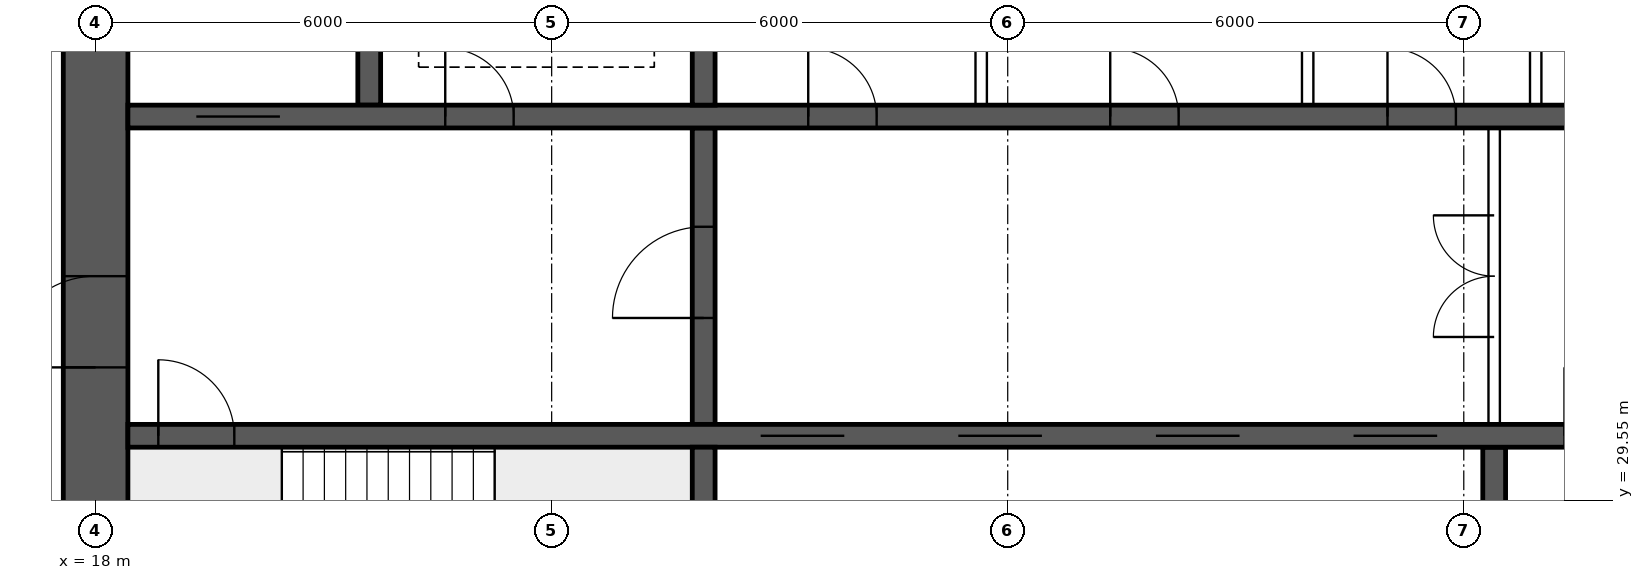
"""IFC4 building model, lengths in metres.
Left out: names, types, materials, properties, quantities, classifications, styles, units other than length and angle.
Written with IfcOpenShell. Run it as: python <this file> out.ifc"""

import sys

from ifc_helpers import new_model, si_unit, direction, frame, frame_2d, origin, place, context, subcontext, project, spatial, rectangle, extrude, element, fill, save


model = new_model("IFC4")
c1 = context("Model", 3, precision=1e-05, world=origin(), true_north=direction((0.0, 1.0)))
c2 = subcontext(c1, "Body", "Model", "MODEL_VIEW")
j1 = project(units=[si_unit("LENGTHUNIT", "METRE"), si_unit("PLANEANGLEUNIT", "RADIAN")], contexts=[c1])
p1 = place(None, origin())
s1 = spatial("IfcSite", under=j1, at=p1, CompositionType="ELEMENT")
p2 = place(p1, origin())
s2 = spatial("IfcBuilding", under=s1, at=p2, CompositionType="ELEMENT")
p3 = place(p2, frame((0.0, 0.0, 167.35)))
s3 = spatial("IfcBuildingStorey", under=s2, at=p3, CompositionType="ELEMENT", Elevation=167.35)
p4 = place(p3, frame((18.0, 26.225, 0.0), z_axis=(0.0, 0.0, 1.0), x_axis=(0.0, 1.0, 0.0)))
e1 = element("IfcWall", 1, at=p4, inside=s3, PredefinedType="SHEAR", context=c2, shape_type="SweptSolid", body=[
    extrude(rectangle(XDim=11.55, YDim=0.85, at=frame_2d((5.775, 0.0))), origin(), (0.0, 0.0, 1.0), 3.75),
])
p5 = place(p4, frame((5.075, 0.0, 0.0)))
e2 = element("IfcOpeningElement", 2, at=p5, cuts=e1, PredefinedType="OPENING", context=c2, shape_type="SweptSolid", body=[
    extrude(rectangle(XDim=1.2, YDim=2.1, at=frame_2d((0.6, 1.05))), frame((0.0, 0.435, 0.0), z_axis=(0.0, -1.0, 0.0), x_axis=(1.0, 0.0, 0.0)), (0.0, 0.0, 1.0), 0.87),
])
p6 = place(p3, frame((18.425, 30.4, 0.0), z_axis=(0.0, 0.0, 1.0), x_axis=(1.0, 0.0, 0.0)))
e3 = element("IfcWall", 3, at=p6, inside=s3, PredefinedType="SHEAR", context=c2, shape_type="SweptSolid", body=[
    extrude(rectangle(XDim=47.15, YDim=0.3, at=frame_2d((23.575, 0.0))), origin(), (0.0, 0.0, 1.0), 3.75),
])
p7 = place(p6, frame((0.4, 0.0, 0.0)))
e4 = element("IfcOpeningElement", 4, at=p7, cuts=e3, PredefinedType="OPENING", context=c2, shape_type="SweptSolid", body=[
    extrude(rectangle(XDim=1.0, YDim=2.1, at=frame_2d((0.5, 1.05))), frame((0.0, 0.16, 0.0), z_axis=(0.0, -1.0, 0.0), x_axis=(1.0, 0.0, 0.0)), (0.0, 0.0, 1.0), 0.32),
])
p8 = place(p6, frame((45.75, 0.0, 0.0)))
e5 = element("IfcOpeningElement", 5, at=p8, cuts=e3, PredefinedType="OPENING", context=c2, shape_type="SweptSolid", body=[
    extrude(rectangle(XDim=1.0, YDim=2.1, at=frame_2d((0.5, 1.05))), frame((0.0, 0.16, 0.0), z_axis=(0.0, -1.0, 0.0), x_axis=(1.0, 0.0, 0.0)), (0.0, 0.0, 1.0), 0.32),
])
p9 = place(p6, frame((8.325, 0.0, 0.0)))
e6 = element("IfcOpeningElement", 6, at=p9, cuts=e3, PredefinedType="OPENING", context=c2, shape_type="SweptSolid", body=[
    extrude(rectangle(XDim=1.1, YDim=2.1, at=frame_2d((0.55, 1.05))), frame((0.0, 0.16, 0.0), z_axis=(0.0, -1.0, 0.0), x_axis=(1.0, 0.0, 0.0)), (0.0, 0.0, 1.0), 0.32),
])
p10 = place(p6, frame((10.925, 0.0, 0.0)))
e7 = element("IfcOpeningElement", 7, at=p10, cuts=e3, PredefinedType="OPENING", context=c2, shape_type="SweptSolid", body=[
    extrude(rectangle(XDim=1.1, YDim=2.1, at=frame_2d((0.55, 1.05))), frame((0.0, 0.16, 0.0), z_axis=(0.0, -1.0, 0.0), x_axis=(1.0, 0.0, 0.0)), (0.0, 0.0, 1.0), 0.32),
])
p11 = place(p6, frame((13.525, 0.0, 0.0)))
e8 = element("IfcOpeningElement", 8, at=p11, cuts=e3, PredefinedType="OPENING", context=c2, shape_type="SweptSolid", body=[
    extrude(rectangle(XDim=1.1, YDim=2.1, at=frame_2d((0.55, 1.05))), frame((0.0, 0.16, 0.0), z_axis=(0.0, -1.0, 0.0), x_axis=(1.0, 0.0, 0.0)), (0.0, 0.0, 1.0), 0.32),
])
p12 = place(p6, frame((16.125, 0.0, 0.0)))
e9 = element("IfcOpeningElement", 9, at=p12, cuts=e3, PredefinedType="OPENING", context=c2, shape_type="SweptSolid", body=[
    extrude(rectangle(XDim=1.1, YDim=2.1, at=frame_2d((0.55, 1.05))), frame((0.0, 0.16, 0.0), z_axis=(0.0, -1.0, 0.0), x_axis=(1.0, 0.0, 0.0)), (0.0, 0.0, 1.0), 0.32),
])
p13 = place(p6, frame((18.9, 0.0, 0.0)))
e10 = element("IfcOpeningElement", 10, at=p13, cuts=e3, PredefinedType="OPENING", context=c2, shape_type="SweptSolid", body=[
    extrude(rectangle(XDim=0.9, YDim=2.1, at=frame_2d((0.45, 1.05))), frame((0.0, 0.16, 0.0), z_axis=(0.0, -1.0, 0.0), x_axis=(1.0, 0.0, 0.0)), (0.0, 0.0, 1.0), 0.32),
])
p14 = place(p6, frame((30.192, 0.0, 0.0)))
e11 = element("IfcOpeningElement", 11, at=p14, cuts=e3, PredefinedType="OPENING", context=c2, shape_type="SweptSolid", body=[
    extrude(rectangle(XDim=1.1, YDim=2.1, at=frame_2d((0.55, 1.05))), frame((0.0, 0.16, 0.0), z_axis=(0.0, -1.0, 0.0), x_axis=(1.0, 0.0, 0.0)), (0.0, 0.0, 1.0), 0.32),
])
p15 = place(p6, frame((33.725, 0.0, 0.0)))
e12 = element("IfcOpeningElement", 12, at=p15, cuts=e3, PredefinedType="OPENING", context=c2, shape_type="SweptSolid", body=[
    extrude(rectangle(XDim=1.1, YDim=2.1, at=frame_2d((0.55, 1.05))), frame((0.0, 0.16, 0.0), z_axis=(0.0, -1.0, 0.0), x_axis=(1.0, 0.0, 0.0)), (0.0, 0.0, 1.0), 0.32),
])
p16 = place(p6, frame((37.258, 0.0, 0.0)))
e13 = element("IfcOpeningElement", 13, at=p16, cuts=e3, PredefinedType="OPENING", context=c2, shape_type="SweptSolid", body=[
    extrude(rectangle(XDim=1.1, YDim=2.1, at=frame_2d((0.55, 1.05))), frame((0.0, 0.16, 0.0), z_axis=(0.0, -1.0, 0.0), x_axis=(1.0, 0.0, 0.0)), (0.0, 0.0, 1.0), 0.32),
])
p17 = place(p3, frame((18.425, 34.6, 0.0), z_axis=(0.0, 0.0, 1.0), x_axis=(1.0, 0.0, 0.0)))
e14 = element("IfcWall", 14, at=p17, inside=s3, PredefinedType="SHEAR", context=c2, shape_type="SweptSolid", body=[
    extrude(rectangle(XDim=47.15, YDim=0.3, at=frame_2d((23.575, 0.0))), origin(), (0.0, 0.0, 1.0), 3.75),
])
p18 = place(p17, frame((0.9, 0.0, 0.0)))
e15 = element("IfcOpeningElement", 15, at=p18, cuts=e14, PredefinedType="OPENING", context=c2, shape_type="SweptSolid", body=[
    extrude(rectangle(XDim=1.1, YDim=2.1, at=frame_2d((0.55, 1.05))), frame((0.0, 0.16, 0.0), z_axis=(0.0, -1.0, 0.0), x_axis=(1.0, 0.0, 0.0)), (0.0, 0.0, 1.0), 0.32),
])
p19 = place(p17, frame((45.15, 0.0, 0.0)))
e16 = element("IfcOpeningElement", 16, at=p19, cuts=e14, PredefinedType="OPENING", context=c2, shape_type="SweptSolid", body=[
    extrude(rectangle(XDim=1.1, YDim=2.1, at=frame_2d((0.55, 1.05))), frame((0.0, 0.16, 0.0), z_axis=(0.0, -1.0, 0.0), x_axis=(1.0, 0.0, 0.0)), (0.0, 0.0, 1.0), 0.32),
])
p20 = place(p17, frame((4.175, 0.0, 0.0)))
e17 = element("IfcOpeningElement", 17, at=p20, cuts=e14, PredefinedType="OPENING", context=c2, shape_type="SweptSolid", body=[
    extrude(rectangle(XDim=0.9, YDim=2.1, at=frame_2d((0.45, 1.05))), frame((0.0, 0.16, 0.0), z_axis=(0.0, -1.0, 0.0), x_axis=(1.0, 0.0, 0.0)), (0.0, 0.0, 1.0), 0.32),
])
p21 = place(p17, frame((42.075, 0.0, 0.0)))
e18 = element("IfcOpeningElement", 18, at=p21, cuts=e14, PredefinedType="OPENING", context=c2, shape_type="SweptSolid", body=[
    extrude(rectangle(XDim=0.9, YDim=2.1, at=frame_2d((0.45, 1.05))), frame((0.0, 0.16, 0.0), z_axis=(0.0, -1.0, 0.0), x_axis=(1.0, 0.0, 0.0)), (0.0, 0.0, 1.0), 0.32),
])
p22 = place(p17, frame((8.95, 0.0, 0.0)))
e19 = element("IfcOpeningElement", 19, at=p22, cuts=e14, PredefinedType="OPENING", context=c2, shape_type="SweptSolid", body=[
    extrude(rectangle(XDim=0.9, YDim=2.1, at=frame_2d((0.45, 1.05))), frame((0.0, 0.16, 0.0), z_axis=(0.0, -1.0, 0.0), x_axis=(1.0, 0.0, 0.0)), (0.0, 0.0, 1.0), 0.32),
])
p23 = place(p17, frame((12.924, 0.0, 0.0)))
e20 = element("IfcOpeningElement", 20, at=p23, cuts=e14, PredefinedType="OPENING", context=c2, shape_type="SweptSolid", body=[
    extrude(rectangle(XDim=0.9, YDim=2.1, at=frame_2d((0.45, 1.05))), frame((0.0, 0.16, 0.0), z_axis=(0.0, -1.0, 0.0), x_axis=(1.0, 0.0, 0.0)), (0.0, 0.0, 1.0), 0.32),
])
p24 = place(p17, frame((16.571, 0.0, 0.0)))
e21 = element("IfcOpeningElement", 21, at=p24, cuts=e14, PredefinedType="OPENING", context=c2, shape_type="SweptSolid", body=[
    extrude(rectangle(XDim=0.9, YDim=2.1, at=frame_2d((0.45, 1.05))), frame((0.0, 0.16, 0.0), z_axis=(0.0, -1.0, 0.0), x_axis=(1.0, 0.0, 0.0)), (0.0, 0.0, 1.0), 0.32),
])
p25 = place(p17, frame((20.33, 0.0, 0.0)))
e22 = element("IfcOpeningElement", 22, at=p25, cuts=e14, PredefinedType="OPENING", context=c2, shape_type="SweptSolid", body=[
    extrude(rectangle(XDim=0.9, YDim=2.1, at=frame_2d((0.45, 1.05))), frame((0.0, 0.16, 0.0), z_axis=(0.0, -1.0, 0.0), x_axis=(1.0, 0.0, 0.0)), (0.0, 0.0, 1.0), 0.32),
])
p26 = place(p17, frame((24.736, 0.0, 0.0)))
e23 = element("IfcOpeningElement", 23, at=p26, cuts=e14, PredefinedType="OPENING", context=c2, shape_type="SweptSolid", body=[
    extrude(rectangle(XDim=0.9, YDim=2.1, at=frame_2d((0.45, 1.05))), frame((0.0, 0.16, 0.0), z_axis=(0.0, -1.0, 0.0), x_axis=(1.0, 0.0, 0.0)), (0.0, 0.0, 1.0), 0.32),
])
p27 = place(p17, frame((27.533, 0.0, 0.0)))
e24 = element("IfcOpeningElement", 24, at=p27, cuts=e14, PredefinedType="OPENING", context=c2, shape_type="SweptSolid", body=[
    extrude(rectangle(XDim=0.9, YDim=2.1, at=frame_2d((0.45, 1.05))), frame((0.0, 0.16, 0.0), z_axis=(0.0, -1.0, 0.0), x_axis=(1.0, 0.0, 0.0)), (0.0, 0.0, 1.0), 0.32),
])
p28 = place(p17, frame((29.906, 0.0, 0.0)))
e25 = element("IfcOpeningElement", 25, at=p28, cuts=e14, PredefinedType="OPENING", context=c2, shape_type="SweptSolid", body=[
    extrude(rectangle(XDim=0.9, YDim=2.1, at=frame_2d((0.45, 1.05))), frame((0.0, 0.16, 0.0), z_axis=(0.0, -1.0, 0.0), x_axis=(1.0, 0.0, 0.0)), (0.0, 0.0, 1.0), 0.32),
])
p29 = place(p17, frame((33.756, 0.0, 0.0)))
e26 = element("IfcOpeningElement", 26, at=p29, cuts=e14, PredefinedType="OPENING", context=c2, shape_type="SweptSolid", body=[
    extrude(rectangle(XDim=0.9, YDim=2.1, at=frame_2d((0.45, 1.05))), frame((0.0, 0.16, 0.0), z_axis=(0.0, -1.0, 0.0), x_axis=(1.0, 0.0, 0.0)), (0.0, 0.0, 1.0), 0.32),
])
p30 = place(p17, frame((37.504, 0.0, 0.0)))
e27 = element("IfcOpeningElement", 27, at=p30, cuts=e14, PredefinedType="OPENING", context=c2, shape_type="SweptSolid", body=[
    extrude(rectangle(XDim=0.9, YDim=2.1, at=frame_2d((0.45, 1.05))), frame((0.0, 0.16, 0.0), z_axis=(0.0, -1.0, 0.0), x_axis=(1.0, 0.0, 0.0)), (0.0, 0.0, 1.0), 0.32),
])
p31 = place(p3, frame((26.0, 26.225, 0.0), z_axis=(0.0, 0.0, 1.0), x_axis=(0.0, 1.0, 0.0)))
e28 = element("IfcWall", 28, at=p31, inside=s3, PredefinedType="SHEAR", context=c2, shape_type="SweptSolid", body=[
    extrude(rectangle(XDim=4.025, YDim=0.3, at=frame_2d((2.012, 0.0))), origin(), (0.0, 0.0, 1.0), 3.75),
])
p32 = place(p3, frame((26.0, 30.55, 0.0), z_axis=(0.0, 0.0, 1.0), x_axis=(0.0, 1.0, 0.0)))
e29 = element("IfcWall", 29, at=p32, inside=s3, PredefinedType="SHEAR", context=c2, shape_type="SweptSolid", body=[
    extrude(rectangle(XDim=3.9, YDim=0.3, at=frame_2d((1.95, 0.0))), origin(), (0.0, 0.0, 1.0), 3.75),
])
p33 = place(p32, frame((1.4, 0.0, 0.0)))
e30 = element("IfcOpeningElement", 30, at=p33, cuts=e29, PredefinedType="OPENING", context=c2, shape_type="SweptSolid", body=[
    extrude(rectangle(XDim=1.2, YDim=2.1, at=frame_2d((0.6, 1.05))), frame((0.0, 0.16, 0.0), z_axis=(0.0, -1.0, 0.0), x_axis=(1.0, 0.0, 0.0)), (0.0, 0.0, 1.0), 0.32),
])
for number, where, z_axis, x_axis in (
    (31, (21.6, 34.75, 0.0), (0.0, 0.0, 1.0), (0.0, 1.0, 0.0)),
    (32, (26.0, 34.75, 0.0), (0.0, 0.0, 1.0), (0.0, 1.0, 0.0)),
):
    element("IfcWall", number, at=place(p3, frame(where, z_axis=z_axis, x_axis=x_axis)), inside=s3, PredefinedType="SHEAR", context=c2, shape_type="SweptSolid", body=[
        extrude(rectangle(XDim=3.025, YDim=0.3, at=frame_2d((1.512, 0.0))), origin(), (0.0, 0.0, 1.0), 3.75),
    ])
p34 = place(p3, frame((36.4, 26.225, 0.0), z_axis=(0.0, 0.0, 1.0), x_axis=(0.0, 1.0, 0.0)))
e33 = element("IfcWall", 33, at=p34, inside=s3, PredefinedType="SHEAR", context=c2, shape_type="SweptSolid", body=[
    extrude(rectangle(XDim=4.025, YDim=0.3, at=frame_2d((2.012, 0.0))), origin(), (0.0, 0.0, 1.0), 3.75),
])
p35 = place(p3, frame((36.4, 30.55, 0.0), z_axis=(0.0, 0.0, 1.0), x_axis=(0.0, 1.0, 0.0)))
e34 = element("IfcWall", 34, at=p35, inside=s3, PredefinedType="SOLIDWALL", context=c2, shape_type="SweptSolid", body=[
    extrude(rectangle(XDim=3.9, YDim=0.15, at=frame_2d((1.95, 0.0))), origin(), (0.0, 0.0, 1.0), 3.5),
])
p36 = place(p35, frame((1.15, 0.0, 0.0)))
e35 = element("IfcOpeningElement", 35, at=p36, cuts=e34, PredefinedType="OPENING", context=c2, shape_type="SweptSolid", body=[
    extrude(rectangle(XDim=1.6, YDim=2.1, at=frame_2d((0.8, 1.05))), frame((0.0, 0.085, 0.0), z_axis=(0.0, -1.0, 0.0), x_axis=(1.0, 0.0, 0.0)), (0.0, 0.0, 1.0), 0.17),
])
for number, where, z_axis, x_axis in (
    (36, (29.651, 34.75, 0.0), (0.0, 0.0, 1.0), (0.0, 1.0, 0.0)),
    (37, (33.946, 34.75, 0.0), (0.0, 0.0, 1.0), (0.0, 1.0, 0.0)),
    (38, (36.946, 34.75, 0.0), (0.0, 0.0, 1.0), (0.0, 1.0, 0.0)),
):
    element("IfcWall", number, at=place(p3, frame(where, z_axis=z_axis, x_axis=x_axis)), inside=s3, PredefinedType="SOLIDWALL", context=c2, shape_type="SweptSolid", body=[
        extrude(rectangle(XDim=3.025, YDim=0.15, at=frame_2d((1.512, 0.0))), origin(), (0.0, 0.0, 1.0), 3.5),
    ])
p37 = place(p36, origin())
e39 = element("IfcDoor", 39, at=p37, inside=s3, OperationType="DOUBLE_DOOR_SINGLE_SWING", PredefinedType="DOOR", context=c2, shape_type="SweptSolid", body=[
    extrude(rectangle(XDim=1.6, YDim=2.1, at=frame_2d((0.8, 1.05))), frame((0.0, 0.025, 0.0), z_axis=(0.0, -1.0, 0.0), x_axis=(1.0, 0.0, 0.0)), (0.0, 0.0, 1.0), 0.05),
])
fill(e35, e39)
p38 = place(p5, origin())
e40 = element("IfcDoor", 40, at=p38, inside=s3, OperationType="SINGLE_SWING_LEFT", PredefinedType="DOOR", context=c2, shape_type="SweptSolid", body=[
    extrude(rectangle(XDim=1.2, YDim=2.1, at=frame_2d((0.6, 1.05))), frame((0.0, 0.025, 0.0), z_axis=(0.0, -1.0, 0.0), x_axis=(1.0, 0.0, 0.0)), (0.0, 0.0, 1.0), 0.05),
])
fill(e2, e40)
p39 = place(p7, origin())
e41 = element("IfcDoor", 41, at=p39, inside=s3, OperationType="SINGLE_SWING_LEFT", PredefinedType="DOOR", context=c2, shape_type="SweptSolid", body=[
    extrude(rectangle(XDim=1.0, YDim=2.1, at=frame_2d((0.5, 1.05))), frame((0.0, 0.025, 0.0), z_axis=(0.0, -1.0, 0.0), x_axis=(1.0, 0.0, 0.0)), (0.0, 0.0, 1.0), 0.05),
])
fill(e4, e41)
p40 = place(p18, origin())
e42 = element("IfcDoor", 42, at=p40, inside=s3, OperationType="DOUBLE_DOOR_SLIDING", PredefinedType="DOOR", context=c2, shape_type="SweptSolid", body=[
    extrude(rectangle(XDim=1.1, YDim=2.1, at=frame_2d((0.55, 1.05))), frame((0.0, 0.025, 0.0), z_axis=(0.0, -1.0, 0.0), x_axis=(1.0, 0.0, 0.0)), (0.0, 0.0, 1.0), 0.05),
])
fill(e15, e42)
p41 = place(p20, origin())
e43 = element("IfcDoor", 43, at=p41, inside=s3, OperationType="SINGLE_SWING_LEFT", PredefinedType="DOOR", context=c2, shape_type="SweptSolid", body=[
    extrude(rectangle(XDim=0.9, YDim=2.1, at=frame_2d((0.45, 1.05))), frame((0.0, 0.025, 0.0), z_axis=(0.0, -1.0, 0.0), x_axis=(1.0, 0.0, 0.0)), (0.0, 0.0, 1.0), 0.05),
])
fill(e17, e43)
p42 = place(p33, origin())
e44 = element("IfcDoor", 44, at=p42, inside=s3, OperationType="SINGLE_SWING_LEFT", PredefinedType="DOOR", context=c2, shape_type="SweptSolid", body=[
    extrude(rectangle(XDim=1.2, YDim=2.1, at=frame_2d((0.6, 1.05))), frame((0.0, 0.025, 0.0), z_axis=(0.0, -1.0, 0.0), x_axis=(1.0, 0.0, 0.0)), (0.0, 0.0, 1.0), 0.05),
])
fill(e30, e44)
p43 = place(p22, origin())
e45 = element("IfcDoor", 45, at=p43, inside=s3, OperationType="SINGLE_SWING_LEFT", PredefinedType="DOOR", context=c2, shape_type="SweptSolid", body=[
    extrude(rectangle(XDim=0.9, YDim=2.1, at=frame_2d((0.45, 1.05))), frame((0.0, 0.025, 0.0), z_axis=(0.0, -1.0, 0.0), x_axis=(1.0, 0.0, 0.0)), (0.0, 0.0, 1.0), 0.05),
])
fill(e19, e45)
p44 = place(p23, origin())
e46 = element("IfcDoor", 46, at=p44, inside=s3, OperationType="SINGLE_SWING_LEFT", PredefinedType="DOOR", context=c2, shape_type="SweptSolid", body=[
    extrude(rectangle(XDim=0.9, YDim=2.1, at=frame_2d((0.45, 1.05))), frame((0.0, 0.025, 0.0), z_axis=(0.0, -1.0, 0.0), x_axis=(1.0, 0.0, 0.0)), (0.0, 0.0, 1.0), 0.05),
])
fill(e20, e46)
p45 = place(p24, origin())
e47 = element("IfcDoor", 47, at=p45, inside=s3, OperationType="SINGLE_SWING_LEFT", PredefinedType="DOOR", context=c2, shape_type="SweptSolid", body=[
    extrude(rectangle(XDim=0.9, YDim=2.1, at=frame_2d((0.45, 1.05))), frame((0.0, 0.025, 0.0), z_axis=(0.0, -1.0, 0.0), x_axis=(1.0, 0.0, 0.0)), (0.0, 0.0, 1.0), 0.05),
])
fill(e21, e47)
p46 = place(p9, origin())
e48 = element("IfcDoor", 48, at=p46, inside=s3, OperationType="DOUBLE_DOOR_SLIDING", PredefinedType="DOOR", context=c2, shape_type="SweptSolid", body=[
    extrude(rectangle(XDim=1.1, YDim=2.1, at=frame_2d((0.55, 1.05))), frame((0.0, 0.025, 0.0), z_axis=(0.0, -1.0, 0.0), x_axis=(1.0, 0.0, 0.0)), (0.0, 0.0, 1.0), 0.05),
])
fill(e6, e48)
p47 = place(p10, origin())
e49 = element("IfcDoor", 49, at=p47, inside=s3, OperationType="DOUBLE_DOOR_SLIDING", PredefinedType="DOOR", context=c2, shape_type="SweptSolid", body=[
    extrude(rectangle(XDim=1.1, YDim=2.1, at=frame_2d((0.55, 1.05))), frame((0.0, 0.025, 0.0), z_axis=(0.0, -1.0, 0.0), x_axis=(1.0, 0.0, 0.0)), (0.0, 0.0, 1.0), 0.05),
])
fill(e7, e49)
p48 = place(p11, origin())
e50 = element("IfcDoor", 50, at=p48, inside=s3, OperationType="DOUBLE_DOOR_SLIDING", PredefinedType="DOOR", context=c2, shape_type="SweptSolid", body=[
    extrude(rectangle(XDim=1.1, YDim=2.1, at=frame_2d((0.55, 1.05))), frame((0.0, 0.025, 0.0), z_axis=(0.0, -1.0, 0.0), x_axis=(1.0, 0.0, 0.0)), (0.0, 0.0, 1.0), 0.05),
])
fill(e8, e50)
p49 = place(p12, origin())
e51 = element("IfcDoor", 51, at=p49, inside=s3, OperationType="DOUBLE_DOOR_SLIDING", PredefinedType="DOOR", context=c2, shape_type="SweptSolid", body=[
    extrude(rectangle(XDim=1.1, YDim=2.1, at=frame_2d((0.55, 1.05))), frame((0.0, 0.025, 0.0), z_axis=(0.0, -1.0, 0.0), x_axis=(1.0, 0.0, 0.0)), (0.0, 0.0, 1.0), 0.05),
])
fill(e9, e51)
save(model, sys.argv[1])
